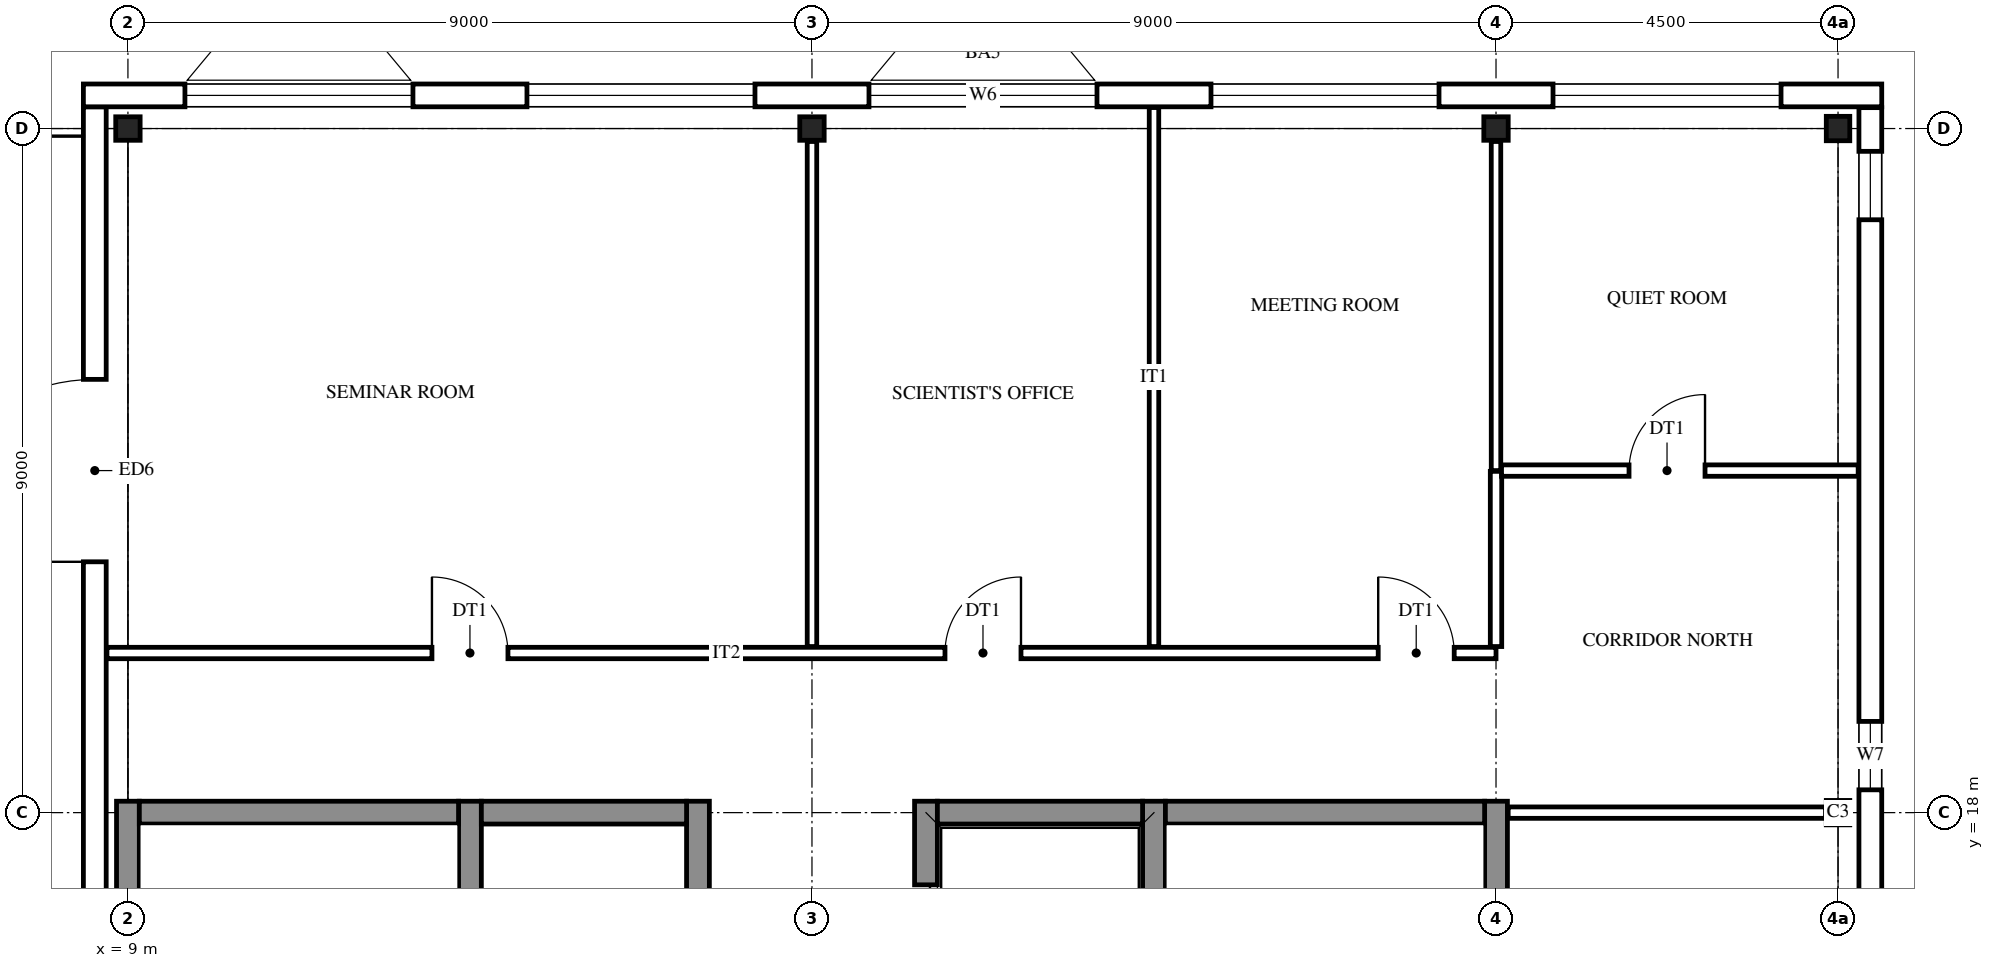
"""IFC4 building model, lengths in metres.
Left out: names, types, materials, properties, quantities, classifications, styles, units other than length and angle.
Written with IfcOpenShell. Run it as: python <this file> out.ifc"""

import sys

from ifc_helpers import new_model, si_unit, direction, frame, frame_2d, origin, origin_2d, place, context, subcontext, project, spatial, rectangle, i_section, extrude, element, fill, save


model = new_model("IFC4")
c1 = context("Model", 3, precision=1e-05, world=origin(), true_north=direction((0.0, 1.0)))
c2 = subcontext(c1, "Body", "Model", "MODEL_VIEW")
j1 = project(units=[si_unit("LENGTHUNIT", "METRE"), si_unit("PLANEANGLEUNIT", "RADIAN")], contexts=[c1])
p1 = place(None, origin())
s1 = spatial("IfcSite", under=j1, at=p1, CompositionType="ELEMENT")
p2 = place(p1, origin())
s2 = spatial("IfcBuilding", under=s1, at=p2, CompositionType="ELEMENT")
p3 = place(p2, frame((0.0, 0.0, 61.2)))
s3 = spatial("IfcBuildingStorey", under=s2, at=p3, CompositionType="ELEMENT", Elevation=61.2)
for number, where, z_axis, x_axis in (
    (1, (9.0, 27.0, 0.0), (0.0, 0.0, 1.0), (0.0, 1.0, 0.0)),
    (2, (18.0, 27.0, 0.0), (0.0, 0.0, 1.0), (0.0, 1.0, 0.0)),
    (3, (27.0, 27.0, 0.0), (0.0, 0.0, 1.0), (0.0, 1.0, 0.0)),
    (4, (31.5, 18.0, 0.0), (0.0, 0.0, 1.0), (1.0, 0.0, 0.0)),
    (5, (31.5, 27.0, 0.0), (0.0, 0.0, 1.0), (1.0, 0.0, 0.0)),
):
    element("IfcColumn", number, at=place(p3, frame(where, z_axis=z_axis, x_axis=x_axis)), inside=s3, PredefinedType="COLUMN", context=c2, shape_type="SweptSolid", body=[
        extrude(i_section(OverallWidth=0.309, OverallDepth=0.321, WebThickness=0.014, FlangeThickness=0.022, FilletRadius=0.017, at=origin_2d()), origin(), (0.0, 0.0, 1.0), 4.2),
    ])
for number, where, z_axis, x_axis in (
    (6, (9.0, 8.85, 0.0), (0.0, 0.0, 1.0), (0.0, 1.0, 0.0)),
    (7, (13.5, 8.85, 0.0), (0.0, 0.0, 1.0), (0.0, 1.0, 0.0)),
):
    element("IfcWall", number, at=place(p3, frame(where, z_axis=z_axis, x_axis=x_axis)), inside=s3, PredefinedType="SHEAR", context=c2, shape_type="SweptSolid", body=[
        extrude(rectangle(XDim=9.3, YDim=0.3, at=frame_2d((4.65, 0.0))), origin(), (0.0, 0.0, 1.0), 4.2),
    ])
p4 = place(p3, frame((16.5, 8.85, 0.0), z_axis=(0.0, 0.0, 1.0), x_axis=(0.0, 1.0, 0.0)))
e8 = element("IfcWall", 8, at=p4, inside=s3, PredefinedType="SHEAR", context=c2, shape_type="SweptSolid", body=[
    extrude(rectangle(XDim=9.3, YDim=0.3, at=frame_2d((4.65, 0.0))), origin(), (0.0, 0.0, 1.0), 4.2),
])
p5 = place(p4, frame((1.1, 0.0, 0.0)))
e9 = element("IfcOpeningElement", 9, at=p5, cuts=e8, PredefinedType="OPENING", context=c2, shape_type="SweptSolid", body=[
    extrude(rectangle(XDim=1.1, YDim=2.1, at=frame_2d((0.55, 1.05))), frame((0.0, 0.16, 0.0), z_axis=(0.0, -1.0, 0.0), x_axis=(1.0, 0.0, 0.0)), (0.0, 0.0, 1.0), 0.32),
])
p6 = place(p4, frame((4.1, 0.0, 0.0)))
e10 = element("IfcOpeningElement", 10, at=p6, cuts=e8, PredefinedType="OPENING", context=c2, shape_type="SweptSolid", body=[
    extrude(rectangle(XDim=1.1, YDim=2.1, at=frame_2d((0.55, 1.05))), frame((0.0, 0.16, 0.0), z_axis=(0.0, -1.0, 0.0), x_axis=(1.0, 0.0, 0.0)), (0.0, 0.0, 1.0), 0.32),
])
p7 = place(p3, frame((19.5, 8.85, 0.0), z_axis=(0.0, 0.0, 1.0), x_axis=(0.0, 1.0, 0.0)))
e11 = element("IfcWall", 11, at=p7, inside=s3, PredefinedType="SHEAR", context=c2, shape_type="SweptSolid", body=[
    extrude(rectangle(XDim=9.3, YDim=0.3, at=frame_2d((4.65, 0.0))), origin(), (0.0, 0.0, 1.0), 4.2),
])
p8 = place(p7, frame((3.95, 0.0, 0.0)))
e12 = element("IfcOpeningElement", 12, at=p8, cuts=e11, PredefinedType="OPENING", context=c2, shape_type="SweptSolid", body=[
    extrude(rectangle(XDim=1.4, YDim=2.1, at=frame_2d((0.7, 1.05))), frame((0.0, 0.16, 0.0), z_axis=(0.0, -1.0, 0.0), x_axis=(1.0, 0.0, 0.0)), (0.0, 0.0, 1.0), 0.32),
])
p9 = place(p7, frame((7.1, 0.0, 0.0)))
e13 = element("IfcOpeningElement", 13, at=p9, cuts=e11, PredefinedType="OPENING", context=c2, shape_type="SweptSolid", body=[
    extrude(rectangle(XDim=1.1, YDim=2.1, at=frame_2d((0.55, 1.05))), frame((0.0, 0.16, 0.0), z_axis=(0.0, -1.0, 0.0), x_axis=(1.0, 0.0, 0.0)), (0.0, 0.0, 1.0), 0.32),
])
for number, where, z_axis, x_axis in (
    (14, (22.5, 8.85, 0.0), (0.0, 0.0, 1.0), (0.0, 1.0, 0.0)),
    (15, (27.0, 8.85, 0.0), (0.0, 0.0, 1.0), (0.0, 1.0, 0.0)),
):
    element("IfcWall", number, at=place(p3, frame(where, z_axis=z_axis, x_axis=x_axis)), inside=s3, PredefinedType="SHEAR", context=c2, shape_type="SweptSolid", body=[
        extrude(rectangle(XDim=9.3, YDim=0.3, at=frame_2d((4.65, 0.0))), origin(), (0.0, 0.0, 1.0), 4.2),
    ])
p10 = place(p3, frame((9.15, 18.0, 0.0), z_axis=(0.0, 0.0, 1.0), x_axis=(1.0, 0.0, 0.0)))
e16 = element("IfcWall", 16, at=p10, inside=s3, PredefinedType="SHEAR", context=c2, shape_type="SweptSolid", body=[
    extrude(rectangle(XDim=4.2, YDim=0.3, at=frame_2d((2.1, 0.0))), origin(), (0.0, 0.0, 1.0), 4.2),
])
for number, where, z_axis, x_axis in (
    (17, (13.65, 18.0, 0.0), (0.0, 0.0, 1.0), (1.0, 0.0, 0.0)),
    (18, (19.65, 18.0, 0.0), (0.0, 0.0, 1.0), (1.0, 0.0, 0.0)),
):
    element("IfcWall", number, at=place(p3, frame(where, z_axis=z_axis, x_axis=x_axis)), inside=s3, PredefinedType="SHEAR", context=c2, shape_type="SweptSolid", body=[
        extrude(rectangle(XDim=2.7, YDim=0.3, at=frame_2d((1.35, 0.0))), origin(), (0.0, 0.0, 1.0), 4.2),
    ])
p11 = place(p3, frame((22.65, 18.0, 0.0), z_axis=(0.0, 0.0, 1.0), x_axis=(1.0, 0.0, 0.0)))
e19 = element("IfcWall", 19, at=p11, inside=s3, PredefinedType="SHEAR", context=c2, shape_type="SweptSolid", body=[
    extrude(rectangle(XDim=4.2, YDim=0.3, at=frame_2d((2.1, 0.0))), origin(), (0.0, 0.0, 1.0), 4.2),
])
p12 = place(p3, frame((8.564, -0.286, 0.0), z_axis=(0.0, 0.0, 1.0), x_axis=(0.0, 1.0, 0.0)))
e20 = element("IfcWall", 20, at=p12, inside=s3, PredefinedType="STANDARD", context=c2, shape_type="SweptSolid", body=[
    extrude(rectangle(XDim=27.572, YDim=0.3, at=frame_2d((13.786, 0.0))), origin(), (0.0, 0.0, 1.0), 4.2),
])
p13 = place(p12, frame((3.586, 0.0, 0.012)))
e21 = element("IfcOpeningElement", 21, at=p13, cuts=e20, PredefinedType="OPENING", context=c2, shape_type="SweptSolid", body=[
    extrude(rectangle(XDim=2.4, YDim=2.4, at=frame_2d((1.2, 1.2))), frame((0.0, 0.16, 0.0), z_axis=(0.0, -1.0, 0.0), x_axis=(1.0, 0.0, 0.0)), (0.0, 0.0, 1.0), 0.32),
])
p14 = place(p12, frame((21.586, 0.0, 0.012)))
e22 = element("IfcOpeningElement", 22, at=p14, cuts=e20, PredefinedType="OPENING", context=c2, shape_type="SweptSolid", body=[
    extrude(rectangle(XDim=2.4, YDim=2.4, at=frame_2d((1.2, 1.2))), frame((0.0, 0.16, 0.0), z_axis=(0.0, -1.0, 0.0), x_axis=(1.0, 0.0, 0.0)), (0.0, 0.0, 1.0), 0.32),
])
p15 = place(p3, frame((8.414, 27.436, 0.0), z_axis=(0.0, 0.0, 1.0), x_axis=(1.0, 0.0, 0.0)))
e23 = element("IfcWall", 23, at=p15, inside=s3, PredefinedType="STANDARD", context=c2, shape_type="SweptSolid", body=[
    extrude(rectangle(XDim=23.661, YDim=0.3, at=frame_2d((11.831, 0.0))), origin(), (0.0, 0.0, 1.0), 4.2),
])
p16 = place(p15, frame((1.336, 0.0, 0.6)))
e24 = element("IfcOpeningElement", 24, at=p16, cuts=e23, PredefinedType="OPENING", context=c2, shape_type="SweptSolid", body=[
    extrude(rectangle(XDim=3.0, YDim=2.8, at=frame_2d((1.5, 1.4))), frame((0.0, 0.16, 0.0), z_axis=(0.0, -1.0, 0.0), x_axis=(1.0, 0.0, 0.0)), (0.0, 0.0, 1.0), 0.32),
])
p17 = place(p15, frame((5.836, 0.0, 0.6)))
e25 = element("IfcOpeningElement", 25, at=p17, cuts=e23, PredefinedType="OPENING", context=c2, shape_type="SweptSolid", body=[
    extrude(rectangle(XDim=3.0, YDim=2.8, at=frame_2d((1.5, 1.4))), frame((0.0, 0.16, 0.0), z_axis=(0.0, -1.0, 0.0), x_axis=(1.0, 0.0, 0.0)), (0.0, 0.0, 1.0), 0.32),
])
p18 = place(p15, frame((10.336, 0.0, 0.6)))
e26 = element("IfcOpeningElement", 26, at=p18, cuts=e23, PredefinedType="OPENING", context=c2, shape_type="SweptSolid", body=[
    extrude(rectangle(XDim=3.0, YDim=2.8, at=frame_2d((1.5, 1.4))), frame((0.0, 0.16, 0.0), z_axis=(0.0, -1.0, 0.0), x_axis=(1.0, 0.0, 0.0)), (0.0, 0.0, 1.0), 0.32),
])
p19 = place(p15, frame((14.836, 0.0, 0.6)))
e27 = element("IfcOpeningElement", 27, at=p19, cuts=e23, PredefinedType="OPENING", context=c2, shape_type="SweptSolid", body=[
    extrude(rectangle(XDim=3.0, YDim=2.8, at=frame_2d((1.5, 1.4))), frame((0.0, 0.16, 0.0), z_axis=(0.0, -1.0, 0.0), x_axis=(1.0, 0.0, 0.0)), (0.0, 0.0, 1.0), 0.32),
])
p20 = place(p15, frame((19.336, 0.0, 0.6)))
e28 = element("IfcOpeningElement", 28, at=p20, cuts=e23, PredefinedType="OPENING", context=c2, shape_type="SweptSolid", body=[
    extrude(rectangle(XDim=3.0, YDim=2.8, at=frame_2d((1.5, 1.4))), frame((0.0, 0.16, 0.0), z_axis=(0.0, -1.0, 0.0), x_axis=(1.0, 0.0, 0.0)), (0.0, 0.0, 1.0), 0.32),
])
p21 = place(p3, frame((31.925, 27.275, 0.0), z_axis=(0.0, 0.0, 1.0), x_axis=(0.0, -1.0, 0.0)))
e29 = element("IfcWall", 29, at=p21, inside=s3, PredefinedType="STANDARD", context=c2, shape_type="SweptSolid", body=[
    extrude(rectangle(XDim=27.55, YDim=0.3, at=frame_2d((13.775, 0.0))), origin(), (0.0, 0.0, 1.0), 4.2),
])
p22 = place(p21, frame((26.075, 0.0, 0.6)))
e30 = element("IfcOpeningElement", 30, at=p22, cuts=e29, PredefinedType="OPENING", context=c2, shape_type="SweptSolid", body=[
    extrude(rectangle(XDim=0.9, YDim=2.3, at=frame_2d((0.45, 1.15))), frame((0.0, 0.16, 0.0), z_axis=(0.0, -1.0, 0.0), x_axis=(1.0, 0.0, 0.0)), (0.0, 0.0, 1.0), 0.32),
])
p23 = place(p21, frame((18.575, 0.0, 0.6)))
e31 = element("IfcOpeningElement", 31, at=p23, cuts=e29, PredefinedType="OPENING", context=c2, shape_type="SweptSolid", body=[
    extrude(rectangle(XDim=0.9, YDim=2.3, at=frame_2d((0.45, 1.15))), frame((0.0, 0.16, 0.0), z_axis=(0.0, -1.0, 0.0), x_axis=(1.0, 0.0, 0.0)), (0.0, 0.0, 1.0), 0.32),
])
p24 = place(p21, frame((15.725, 0.0, 1.6)))
e32 = element("IfcOpeningElement", 32, at=p24, cuts=e29, PredefinedType="OPENING", context=c2, shape_type="SweptSolid", body=[
    extrude(rectangle(XDim=0.6, YDim=0.9, at=frame_2d((0.3, 0.45))), frame((0.0, 0.16, 0.0), z_axis=(0.0, -1.0, 0.0), x_axis=(1.0, 0.0, 0.0)), (0.0, 0.0, 1.0), 0.32),
])
p25 = place(p21, frame((11.225, 0.0, 1.6)))
e33 = element("IfcOpeningElement", 33, at=p25, cuts=e29, PredefinedType="OPENING", context=c2, shape_type="SweptSolid", body=[
    extrude(rectangle(XDim=0.6, YDim=0.9, at=frame_2d((0.3, 0.45))), frame((0.0, 0.16, 0.0), z_axis=(0.0, -1.0, 0.0), x_axis=(1.0, 0.0, 0.0)), (0.0, 0.0, 1.0), 0.32),
])
p26 = place(p21, frame((8.075, 0.0, 0.6)))
e34 = element("IfcOpeningElement", 34, at=p26, cuts=e29, PredefinedType="OPENING", context=c2, shape_type="SweptSolid", body=[
    extrude(rectangle(XDim=0.9, YDim=2.3, at=frame_2d((0.45, 1.15))), frame((0.0, 0.16, 0.0), z_axis=(0.0, -1.0, 0.0), x_axis=(1.0, 0.0, 0.0)), (0.0, 0.0, 1.0), 0.32),
])
p27 = place(p21, frame((0.575, 0.0, 0.6)))
e35 = element("IfcOpeningElement", 35, at=p27, cuts=e29, PredefinedType="OPENING", context=c2, shape_type="SweptSolid", body=[
    extrude(rectangle(XDim=0.9, YDim=2.3, at=frame_2d((0.45, 1.15))), frame((0.0, 0.16, 0.0), z_axis=(0.0, -1.0, 0.0), x_axis=(1.0, 0.0, 0.0)), (0.0, 0.0, 1.0), 0.32),
])
p28 = place(p3, frame((18.0, 20.185, 0.0), z_axis=(0.0, 0.0, 1.0), x_axis=(0.0, 1.0, 0.0)))
e36 = element("IfcWall", 36, at=p28, inside=s3, PredefinedType="PARTITIONING", context=c2, shape_type="SweptSolid", body=[
    extrude(rectangle(XDim=6.645, YDim=0.125, at=frame_2d((3.322, 0.0))), origin(), (0.0, 0.0, 1.0), 3.537),
])
p29 = place(p3, frame((22.5, 20.185, 0.0), z_axis=(0.0, 0.0, 1.0), x_axis=(0.0, 1.0, 0.0)))
e37 = element("IfcWall", 37, at=p29, inside=s3, PredefinedType="PARTITIONING", context=c2, shape_type="SweptSolid", body=[
    extrude(rectangle(XDim=7.091, YDim=0.125, at=frame_2d((3.545, 0.0))), origin(), (0.0, 0.0, 1.0), 3.537),
])
p30 = place(p3, frame((27.0, 20.185, 0.0), z_axis=(0.0, 0.0, 1.0), x_axis=(0.0, 1.0, 0.0)))
e38 = element("IfcWall", 38, at=p30, inside=s3, PredefinedType="PARTITIONING", context=c2, shape_type="SweptSolid", body=[
    extrude(rectangle(XDim=2.305, YDim=0.15, at=frame_2d((1.152, 0.0))), origin(), (0.0, 0.0, 1.0), 3.537),
])
p31 = place(p3, frame((27.0, 22.5, 0.0), z_axis=(0.0, 0.0, 1.0), x_axis=(0.0, 1.0, 0.0)))
e39 = element("IfcWall", 39, at=p31, inside=s3, PredefinedType="PARTITIONING", context=c2, shape_type="SweptSolid", body=[
    extrude(rectangle(XDim=4.33, YDim=0.125, at=frame_2d((2.165, 0.0))), origin(), (0.0, 0.0, 1.0), 3.537),
])
p32 = place(p3, frame((27.16, 18.0, 0.0), z_axis=(0.0, 0.0, 1.0), x_axis=(1.0, 0.0, 0.0)))
e40 = element("IfcWall", 40, at=p32, inside=s3, PredefinedType="PARTITIONING", context=c2, shape_type="SweptSolid", body=[
    extrude(rectangle(XDim=4.176, YDim=0.15, at=frame_2d((2.088, 0.0))), origin(), (0.0, 0.0, 1.0), 3.537),
])
p33 = place(p3, frame((8.724, 20.1, 0.0), z_axis=(0.0, 0.0, 1.0), x_axis=(1.0, 0.0, 0.0)))
e41 = element("IfcWall", 41, at=p33, inside=s3, PredefinedType="PARTITIONING", context=c2, shape_type="SweptSolid", body=[
    extrude(rectangle(XDim=18.276, YDim=0.15, at=frame_2d((9.138, 0.0))), origin(), (0.0, 0.0, 1.0), 3.537),
])
p34 = place(p33, frame((4.276, 0.0, 0.0)))
e42 = element("IfcOpeningElement", 42, at=p34, cuts=e41, PredefinedType="OPENING", context=c2, shape_type="SweptSolid", body=[
    extrude(rectangle(XDim=1.0, YDim=2.1, at=frame_2d((0.5, 1.05))), frame((0.0, 0.085, 0.0), z_axis=(0.0, -1.0, 0.0), x_axis=(1.0, 0.0, 0.0)), (0.0, 0.0, 1.0), 0.17),
])
p35 = place(p33, frame((11.026, 0.0, 0.0)))
e43 = element("IfcOpeningElement", 43, at=p35, cuts=e41, PredefinedType="OPENING", context=c2, shape_type="SweptSolid", body=[
    extrude(rectangle(XDim=1.0, YDim=2.1, at=frame_2d((0.5, 1.05))), frame((0.0, 0.085, 0.0), z_axis=(0.0, -1.0, 0.0), x_axis=(1.0, 0.0, 0.0)), (0.0, 0.0, 1.0), 0.17),
])
p36 = place(p33, frame((16.726, 0.0, 0.0)))
e44 = element("IfcOpeningElement", 44, at=p36, cuts=e41, PredefinedType="OPENING", context=c2, shape_type="SweptSolid", body=[
    extrude(rectangle(XDim=1.0, YDim=2.1, at=frame_2d((0.5, 1.05))), frame((0.0, 0.085, 0.0), z_axis=(0.0, -1.0, 0.0), x_axis=(1.0, 0.0, 0.0)), (0.0, 0.0, 1.0), 0.17),
])
p37 = place(p3, frame((27.073, 22.5, 0.0), z_axis=(0.0, 0.0, 1.0), x_axis=(1.0, 0.0, 0.0)))
e45 = element("IfcWall", 45, at=p37, inside=s3, PredefinedType="PARTITIONING", context=c2, shape_type="SweptSolid", body=[
    extrude(rectangle(XDim=4.692, YDim=0.15, at=frame_2d((2.346, 0.0))), origin(), (0.0, 0.0, 1.0), 3.537),
])
p38 = place(p37, frame((1.677, 0.0, 0.0)))
e46 = element("IfcOpeningElement", 46, at=p38, cuts=e45, PredefinedType="OPENING", context=c2, shape_type="SweptSolid", body=[
    extrude(rectangle(XDim=1.0, YDim=2.1, at=frame_2d((0.5, 1.05))), frame((0.0, 0.085, 0.0), z_axis=(0.0, -1.0, 0.0), x_axis=(1.0, 0.0, 0.0)), (0.0, 0.0, 1.0), 0.17),
])
p39 = place(p14, origin())
e47 = element("IfcDoor", 47, at=p39, inside=s3, OperationType="DOUBLE_DOOR_DOUBLE_SWING", PredefinedType="DOOR", context=c2, shape_type="SweptSolid", body=[
    extrude(rectangle(XDim=2.4, YDim=2.4, at=frame_2d((1.2, 1.2))), frame((0.0, 0.025, 0.0), z_axis=(0.0, -1.0, 0.0), x_axis=(1.0, 0.0, 0.0)), (0.0, 0.0, 1.0), 0.05),
])
fill(e22, e47)
p40 = place(p16, origin())
e48 = element("IfcWindow", 48, at=p40, inside=s3, PartitioningType="SINGLE_PANEL", PredefinedType="WINDOW", context=c2, shape_type="SweptSolid", body=[
    extrude(rectangle(XDim=3.0, YDim=2.8, at=frame_2d((1.5, 1.4))), frame((0.0, 0.03, 0.0), z_axis=(0.0, -1.0, 0.0), x_axis=(1.0, 0.0, 0.0)), (0.0, 0.0, 1.0), 0.06),
])
fill(e24, e48)
p41 = place(p17, origin())
e49 = element("IfcWindow", 49, at=p41, inside=s3, PartitioningType="SINGLE_PANEL", PredefinedType="WINDOW", context=c2, shape_type="SweptSolid", body=[
    extrude(rectangle(XDim=3.0, YDim=2.8, at=frame_2d((1.5, 1.4))), frame((0.0, 0.03, 0.0), z_axis=(0.0, -1.0, 0.0), x_axis=(1.0, 0.0, 0.0)), (0.0, 0.0, 1.0), 0.06),
])
fill(e25, e49)
p42 = place(p18, origin())
e50 = element("IfcWindow", 50, at=p42, inside=s3, PartitioningType="SINGLE_PANEL", PredefinedType="WINDOW", context=c2, shape_type="SweptSolid", body=[
    extrude(rectangle(XDim=3.0, YDim=2.8, at=frame_2d((1.5, 1.4))), frame((0.0, 0.03, 0.0), z_axis=(0.0, -1.0, 0.0), x_axis=(1.0, 0.0, 0.0)), (0.0, 0.0, 1.0), 0.06),
])
fill(e26, e50)
p43 = place(p19, origin())
e51 = element("IfcWindow", 51, at=p43, inside=s3, PartitioningType="SINGLE_PANEL", PredefinedType="WINDOW", context=c2, shape_type="SweptSolid", body=[
    extrude(rectangle(XDim=3.0, YDim=2.8, at=frame_2d((1.5, 1.4))), frame((0.0, 0.03, 0.0), z_axis=(0.0, -1.0, 0.0), x_axis=(1.0, 0.0, 0.0)), (0.0, 0.0, 1.0), 0.06),
])
fill(e27, e51)
p44 = place(p20, origin())
e52 = element("IfcWindow", 52, at=p44, inside=s3, PartitioningType="SINGLE_PANEL", PredefinedType="WINDOW", context=c2, shape_type="SweptSolid", body=[
    extrude(rectangle(XDim=3.0, YDim=2.8, at=frame_2d((1.5, 1.4))), frame((0.0, 0.03, 0.0), z_axis=(0.0, -1.0, 0.0), x_axis=(1.0, 0.0, 0.0)), (0.0, 0.0, 1.0), 0.06),
])
fill(e28, e52)
p45 = place(p26, origin())
e53 = element("IfcWindow", 53, at=p45, inside=s3, PartitioningType="SINGLE_PANEL", PredefinedType="WINDOW", context=c2, shape_type="SweptSolid", body=[
    extrude(rectangle(XDim=0.9, YDim=2.3, at=frame_2d((0.45, 1.15))), frame((0.0, 0.03, 0.0), z_axis=(0.0, -1.0, 0.0), x_axis=(1.0, 0.0, 0.0)), (0.0, 0.0, 1.0), 0.06),
])
fill(e34, e53)
p46 = place(p27, origin())
e54 = element("IfcWindow", 54, at=p46, inside=s3, PartitioningType="SINGLE_PANEL", PredefinedType="WINDOW", context=c2, shape_type="SweptSolid", body=[
    extrude(rectangle(XDim=0.9, YDim=2.3, at=frame_2d((0.45, 1.15))), frame((0.0, 0.03, 0.0), z_axis=(0.0, -1.0, 0.0), x_axis=(1.0, 0.0, 0.0)), (0.0, 0.0, 1.0), 0.06),
])
fill(e35, e54)
p47 = place(p34, origin())
e55 = element("IfcDoor", 55, at=p47, inside=s3, OperationType="SINGLE_SWING_LEFT", PredefinedType="DOOR", context=c2, shape_type="SweptSolid", body=[
    extrude(rectangle(XDim=1.0, YDim=2.1, at=frame_2d((0.5, 1.05))), frame((0.0, 0.025, 0.0), z_axis=(0.0, -1.0, 0.0), x_axis=(1.0, 0.0, 0.0)), (0.0, 0.0, 1.0), 0.05),
])
fill(e42, e55)
p48 = place(p35, origin())
e56 = element("IfcDoor", 56, at=p48, inside=s3, OperationType="SINGLE_SWING_RIGHT", PredefinedType="DOOR", context=c2, shape_type="SweptSolid", body=[
    extrude(rectangle(XDim=1.0, YDim=2.1, at=frame_2d((0.5, 1.05))), frame((0.0, 0.025, 0.0), z_axis=(0.0, -1.0, 0.0), x_axis=(1.0, 0.0, 0.0)), (0.0, 0.0, 1.0), 0.05),
])
fill(e43, e56)
p49 = place(p36, origin())
e57 = element("IfcDoor", 57, at=p49, inside=s3, OperationType="SINGLE_SWING_LEFT", PredefinedType="DOOR", context=c2, shape_type="SweptSolid", body=[
    extrude(rectangle(XDim=1.0, YDim=2.1, at=frame_2d((0.5, 1.05))), frame((0.0, 0.025, 0.0), z_axis=(0.0, -1.0, 0.0), x_axis=(1.0, 0.0, 0.0)), (0.0, 0.0, 1.0), 0.05),
])
fill(e44, e57)
p50 = place(p38, origin())
e58 = element("IfcDoor", 58, at=p50, inside=s3, OperationType="SINGLE_SWING_RIGHT", PredefinedType="DOOR", context=c2, shape_type="SweptSolid", body=[
    extrude(rectangle(XDim=1.0, YDim=2.1, at=frame_2d((0.5, 1.05))), frame((0.0, 0.025, 0.0), z_axis=(0.0, -1.0, 0.0), x_axis=(1.0, 0.0, 0.0)), (0.0, 0.0, 1.0), 0.05),
])
fill(e46, e58)
p51 = place(p9, origin())
e59 = element("IfcDoor", 59, at=p51, inside=s3, OperationType="DOUBLE_DOOR_SLIDING", PredefinedType="DOOR", context=c2, shape_type="SweptSolid", body=[
    extrude(rectangle(XDim=1.1, YDim=2.1, at=frame_2d((0.55, 1.05))), frame((0.0, 0.025, 0.0), z_axis=(0.0, -1.0, 0.0), x_axis=(1.0, 0.0, 0.0)), (0.0, 0.0, 1.0), 0.05),
])
fill(e13, e59)
save(model, sys.argv[1])
